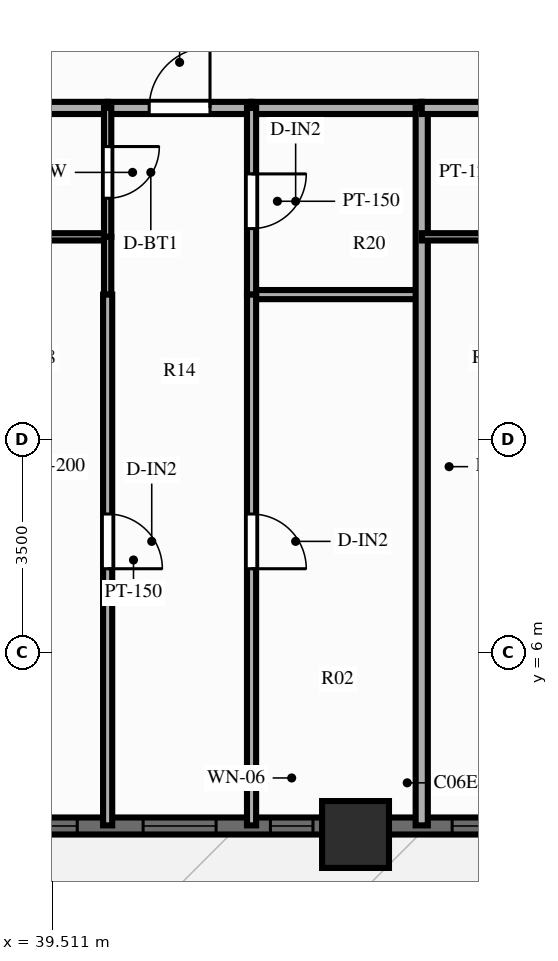
"""IFC4 building model, lengths in metres.
Left out: names, types, materials, properties, quantities, classifications, styles, units other than length and angle.
Written with IfcOpenShell. Run it as: python <this file> out.ifc"""

import sys

from ifc_helpers import new_model, si_unit, direction, frame, frame_2d, origin, origin_2d, place, context, subcontext, project, spatial, rectangle, extrude, source, transform, mapped, element, fill, save


model = new_model("IFC4")
c1 = context("Model", 3, precision=1e-05, world=origin(), true_north=direction((0.0, 1.0)))
c2 = subcontext(c1, "Body", "Model", "MODEL_VIEW")
j1 = project(units=[si_unit("LENGTHUNIT", "METRE"), si_unit("PLANEANGLEUNIT", "RADIAN")], contexts=[c1])
p1 = place(None, origin())
s1 = spatial("IfcSite", under=j1, at=p1, CompositionType="ELEMENT")
p2 = place(p1, origin())
s2 = spatial("IfcBuilding", under=s1, at=p2, CompositionType="ELEMENT")
p3 = place(p2, frame((0.0, 0.0, 22.4)))
s3 = spatial("IfcBuildingStorey", under=s2, at=p3, CompositionType="ELEMENT", Elevation=22.4)
m1 = source(origin(), c2, "Body", "SweptSolid", [
    extrude(rectangle(XDim=1.1, YDim=1.1, at=origin_2d()), origin(), (0.0, 0.0, 1.0), 3.0),
])
p4 = place(p3, frame((44.5, 3.0, 0.0), z_axis=(0.0, 0.0, 1.0), x_axis=(1.0, 0.0, 0.0)))
e1 = element("IfcColumn", 1, at=p4, inside=s3, PredefinedType="COLUMN", context=c2, shape_type="MappedRepresentation", body=[
    mapped(m1, transform((0.0, 0.0, 0.0), scale=1.0)),
])
p5 = place(p3, frame((15.5, 3.14, 0.0), z_axis=(0.0, 0.0, 1.0), x_axis=(1.0, 0.0, 0.0)))
e2 = element("IfcWall", 2, at=p5, inside=s3, PredefinedType="SOLIDWALL", context=c2, shape_type="SweptSolid", body=[
    extrude(rectangle(XDim=45.0, YDim=0.28, at=frame_2d((22.5, 0.0))), origin(), (0.0, 0.0, 1.0), 2.28),
])
p6 = place(p5, frame((0.785, 0.0, 0.25)))
e3 = element("IfcOpeningElement", 3, at=p6, cuts=e2, PredefinedType="OPENING", context=c2, shape_type="SweptSolid", body=[
    extrude(rectangle(XDim=1.2, YDim=1.5, at=frame_2d((0.6, 0.75))), frame((0.0, 0.152, 0.0), z_axis=(0.0, -1.0, 0.0), x_axis=(1.0, 0.0, 0.0)), (0.0, 0.0, 1.0), 0.304),
])
p7 = place(p5, frame((3.033, 0.0, 0.25)))
e4 = element("IfcOpeningElement", 4, at=p7, cuts=e2, PredefinedType="OPENING", context=c2, shape_type="SweptSolid", body=[
    extrude(rectangle(XDim=1.2, YDim=1.5, at=frame_2d((0.6, 0.75))), frame((0.0, 0.152, 0.0), z_axis=(0.0, -1.0, 0.0), x_axis=(1.0, 0.0, 0.0)), (0.0, 0.0, 1.0), 0.304),
])
p8 = place(p5, frame((5.727, 0.0, 0.25)))
e5 = element("IfcOpeningElement", 5, at=p8, cuts=e2, PredefinedType="OPENING", context=c2, shape_type="SweptSolid", body=[
    extrude(rectangle(XDim=1.2, YDim=1.5, at=frame_2d((0.6, 0.75))), frame((0.0, 0.152, 0.0), z_axis=(0.0, -1.0, 0.0), x_axis=(1.0, 0.0, 0.0)), (0.0, 0.0, 1.0), 0.304),
])
p9 = place(p5, frame((8.269, 0.0, 0.25)))
e6 = element("IfcOpeningElement", 6, at=p9, cuts=e2, PredefinedType="OPENING", context=c2, shape_type="SweptSolid", body=[
    extrude(rectangle(XDim=1.2, YDim=1.5, at=frame_2d((0.6, 0.75))), frame((0.0, 0.152, 0.0), z_axis=(0.0, -1.0, 0.0), x_axis=(1.0, 0.0, 0.0)), (0.0, 0.0, 1.0), 0.304),
])
p10 = place(p5, frame((10.621, 0.0, 0.25)))
e7 = element("IfcOpeningElement", 7, at=p10, cuts=e2, PredefinedType="OPENING", context=c2, shape_type="SweptSolid", body=[
    extrude(rectangle(XDim=1.2, YDim=1.5, at=frame_2d((0.6, 0.75))), frame((0.0, 0.152, 0.0), z_axis=(0.0, -1.0, 0.0), x_axis=(1.0, 0.0, 0.0)), (0.0, 0.0, 1.0), 0.304),
])
p11 = place(p5, frame((13.316, 0.0, 0.25)))
e8 = element("IfcOpeningElement", 8, at=p11, cuts=e2, PredefinedType="OPENING", context=c2, shape_type="SweptSolid", body=[
    extrude(rectangle(XDim=1.2, YDim=1.5, at=frame_2d((0.6, 0.75))), frame((0.0, 0.152, 0.0), z_axis=(0.0, -1.0, 0.0), x_axis=(1.0, 0.0, 0.0)), (0.0, 0.0, 1.0), 0.304),
])
p12 = place(p5, frame((16.624, 0.0, 0.25)))
e9 = element("IfcOpeningElement", 9, at=p12, cuts=e2, PredefinedType="OPENING", context=c2, shape_type="SweptSolid", body=[
    extrude(rectangle(XDim=0.7, YDim=1.5, at=frame_2d((0.35, 0.75))), frame((0.0, 0.152, 0.0), z_axis=(0.0, -1.0, 0.0), x_axis=(1.0, 0.0, 0.0)), (0.0, 0.0, 1.0), 0.304),
])
p13 = place(p5, frame((18.141, 0.0, 0.25)))
e10 = element("IfcOpeningElement", 10, at=p13, cuts=e2, PredefinedType="OPENING", context=c2, shape_type="SweptSolid", body=[
    extrude(rectangle(XDim=1.2, YDim=1.5, at=frame_2d((0.6, 0.75))), frame((0.0, 0.152, 0.0), z_axis=(0.0, -1.0, 0.0), x_axis=(1.0, 0.0, 0.0)), (0.0, 0.0, 1.0), 0.304),
])
p14 = place(p5, frame((21.874, 0.0, 0.0), z_axis=(0.0, 0.0, 1.0), x_axis=(-1.0, 0.0, 0.0)))
e11 = element("IfcOpeningElement", 11, at=p14, cuts=e2, PredefinedType="OPENING", context=c2, shape_type="SweptSolid", body=[
    extrude(rectangle(XDim=1.1, YDim=2.15, at=frame_2d((0.55, 1.075))), frame((0.0, 0.152, 0.0), z_axis=(0.0, -1.0, 0.0), x_axis=(1.0, 0.0, 0.0)), (0.0, 0.0, 1.0), 0.304),
])
p15 = place(p5, frame((23.223, 0.0, 0.25)))
e12 = element("IfcOpeningElement", 12, at=p15, cuts=e2, PredefinedType="OPENING", context=c2, shape_type="SweptSolid", body=[
    extrude(rectangle(XDim=1.2, YDim=1.5, at=frame_2d((0.6, 0.75))), frame((0.0, 0.152, 0.0), z_axis=(0.0, -1.0, 0.0), x_axis=(1.0, 0.0, 0.0)), (0.0, 0.0, 1.0), 0.304),
])
p16 = place(p5, frame((25.507, 0.0, 0.25)))
e13 = element("IfcOpeningElement", 13, at=p16, cuts=e2, PredefinedType="OPENING", context=c2, shape_type="SweptSolid", body=[
    extrude(rectangle(XDim=1.2, YDim=1.5, at=frame_2d((0.6, 0.75))), frame((0.0, 0.152, 0.0), z_axis=(0.0, -1.0, 0.0), x_axis=(1.0, 0.0, 0.0)), (0.0, 0.0, 1.0), 0.304),
])
p17 = place(p5, frame((27.6, 0.0, 0.25)))
e14 = element("IfcOpeningElement", 14, at=p17, cuts=e2, PredefinedType="OPENING", context=c2, shape_type="SweptSolid", body=[
    extrude(rectangle(XDim=0.7, YDim=1.5, at=frame_2d((0.35, 0.75))), frame((0.0, 0.152, 0.0), z_axis=(0.0, -1.0, 0.0), x_axis=(1.0, 0.0, 0.0)), (0.0, 0.0, 1.0), 0.304),
])
p18 = place(p5, frame((30.589, 0.0, 0.25)))
e15 = element("IfcOpeningElement", 15, at=p18, cuts=e2, PredefinedType="OPENING", context=c2, shape_type="SweptSolid", body=[
    extrude(rectangle(XDim=1.2, YDim=1.5, at=frame_2d((0.6, 0.75))), frame((0.0, 0.152, 0.0), z_axis=(0.0, -1.0, 0.0), x_axis=(1.0, 0.0, 0.0)), (0.0, 0.0, 1.0), 0.304),
])
p19 = place(p5, frame((32.872, 0.0, 0.25)))
e16 = element("IfcOpeningElement", 16, at=p19, cuts=e2, PredefinedType="OPENING", context=c2, shape_type="SweptSolid", body=[
    extrude(rectangle(XDim=1.2, YDim=1.5, at=frame_2d((0.6, 0.75))), frame((0.0, 0.152, 0.0), z_axis=(0.0, -1.0, 0.0), x_axis=(1.0, 0.0, 0.0)), (0.0, 0.0, 1.0), 0.304),
])
p20 = place(p5, frame((35.455, 0.0, 0.25)))
e17 = element("IfcOpeningElement", 17, at=p20, cuts=e2, PredefinedType="OPENING", context=c2, shape_type="SweptSolid", body=[
    extrude(rectangle(XDim=1.2, YDim=1.5, at=frame_2d((0.6, 0.75))), frame((0.0, 0.152, 0.0), z_axis=(0.0, -1.0, 0.0), x_axis=(1.0, 0.0, 0.0)), (0.0, 0.0, 1.0), 0.304),
])
p21 = place(p5, frame((37.954, 0.0, 0.25)))
e18 = element("IfcOpeningElement", 18, at=p21, cuts=e2, PredefinedType="OPENING", context=c2, shape_type="SweptSolid", body=[
    extrude(rectangle(XDim=1.2, YDim=1.5, at=frame_2d((0.6, 0.75))), frame((0.0, 0.152, 0.0), z_axis=(0.0, -1.0, 0.0), x_axis=(1.0, 0.0, 0.0)), (0.0, 0.0, 1.0), 0.304),
])
p22 = place(p5, frame((40.238, 0.0, 0.25)))
e19 = element("IfcOpeningElement", 19, at=p22, cuts=e2, PredefinedType="OPENING", context=c2, shape_type="SweptSolid", body=[
    extrude(rectangle(XDim=1.2, YDim=1.5, at=frame_2d((0.6, 0.75))), frame((0.0, 0.152, 0.0), z_axis=(0.0, -1.0, 0.0), x_axis=(1.0, 0.0, 0.0)), (0.0, 0.0, 1.0), 0.304),
])
p23 = place(p5, frame((42.716, 0.0, 0.25)))
e20 = element("IfcOpeningElement", 20, at=p23, cuts=e2, PredefinedType="OPENING", context=c2, shape_type="SweptSolid", body=[
    extrude(rectangle(XDim=1.2, YDim=1.5, at=frame_2d((0.6, 0.75))), frame((0.0, 0.152, 0.0), z_axis=(0.0, -1.0, 0.0), x_axis=(1.0, 0.0, 0.0)), (0.0, 0.0, 1.0), 0.304),
])
p24 = place(p3, frame((38.223, 14.95, 0.0), z_axis=(0.0, 0.0, 1.0), x_axis=(1.0, 0.0, 0.0)))
e21 = element("IfcWall", 21, at=p24, inside=s3, PredefinedType="PARTITIONING", context=c2, shape_type="SweptSolid", body=[
    extrude(rectangle(XDim=2.2, YDim=0.2, at=frame_2d((1.1, 0.0))), origin(), (0.0, 0.0, 1.0), 2.79),
])
p25 = place(p3, frame((40.423, 14.95, 0.0), z_axis=(0.0, 0.0, 1.0), x_axis=(1.0, 0.0, 0.0)))
e22 = element("IfcWall", 22, at=p25, inside=s3, PredefinedType="PARTITIONING", context=c2, shape_type="SweptSolid", body=[
    extrude(rectangle(XDim=2.367, YDim=0.2, at=frame_2d((1.183, 0.0))), origin(), (0.0, 0.0, 1.0), 2.79),
])
p26 = place(p25, frame((0.683, 0.0, 0.0)))
e23 = element("IfcOpeningElement", 23, at=p26, cuts=e22, PredefinedType="OPENING", context=c2, shape_type="SweptSolid", body=[
    extrude(rectangle(XDim=1.0, YDim=2.15, at=frame_2d((0.5, 1.075))), frame((0.0, 0.112, 0.0), z_axis=(0.0, -1.0, 0.0), x_axis=(1.0, 0.0, 0.0)), (0.0, 0.0, 1.0), 0.224),
])
p27 = place(p3, frame((42.79, 14.95, 0.0), z_axis=(0.0, 0.0, 1.0), x_axis=(1.0, 0.0, 0.0)))
e24 = element("IfcWall", 24, at=p27, inside=s3, PredefinedType="PARTITIONING", context=c2, shape_type="SweptSolid", body=[
    extrude(rectangle(XDim=2.799, YDim=0.2, at=frame_2d((1.399, 0.0))), origin(), (0.0, 0.0, 1.0), 2.79),
])
p28 = place(p3, frame((38.223, 12.83, 0.0), z_axis=(0.0, 0.0, 1.0), x_axis=(1.0, 0.0, 0.0)))
e25 = element("IfcWall", 25, at=p28, inside=s3, PredefinedType="PARTITIONING", context=c2, shape_type="SweptSolid", body=[
    extrude(rectangle(XDim=2.2, YDim=0.12, at=frame_2d((1.1, 0.0))), origin(), (0.0, 0.0, 1.0), 2.79),
])
p29 = place(p3, frame((42.79, 11.88, 0.0), z_axis=(0.0, 0.0, 1.0), x_axis=(1.0, 0.0, 0.0)))
e26 = element("IfcWall", 26, at=p29, inside=s3, PredefinedType="PARTITIONING", context=c2, shape_type="SweptSolid", body=[
    extrude(rectangle(XDim=2.799, YDim=0.15, at=frame_2d((1.399, 0.0))), origin(), (0.0, 0.0, 1.0), 2.79),
])
p30 = place(p3, frame((40.423, 14.95, 0.0), z_axis=(0.0, 0.0, 1.0), x_axis=(0.0, -1.0, 0.0)))
e27 = element("IfcWall", 27, at=p30, inside=s3, PredefinedType="PARTITIONING", context=c2, shape_type="SweptSolid", body=[
    extrude(rectangle(XDim=2.12, YDim=0.12, at=frame_2d((1.06, 0.0))), origin(), (0.0, 0.0, 1.0), 2.79),
])
p31 = place(p30, frame((0.635, 0.0, 0.0)))
e28 = element("IfcOpeningElement", 28, at=p31, cuts=e27, PredefinedType="OPENING", context=c2, shape_type="SweptSolid", body=[
    extrude(rectangle(XDim=0.85, YDim=2.05, at=frame_2d((0.425, 1.025))), frame((0.0, 0.072, 0.0), z_axis=(0.0, -1.0, 0.0), x_axis=(1.0, 0.0, 0.0)), (0.0, 0.0, 1.0), 0.144),
])
p32 = place(p3, frame((40.423, 12.83, 0.0), z_axis=(0.0, 0.0, 1.0), x_axis=(0.0, -1.0, 0.0)))
e29 = element("IfcWall", 29, at=p32, inside=s3, PredefinedType="PARTITIONING", context=c2, shape_type="SweptSolid", body=[
    extrude(rectangle(XDim=0.95, YDim=0.12, at=frame_2d((0.475, 0.0))), origin(), (0.0, 0.0, 1.0), 2.79),
])
p33 = place(p3, frame((40.423, 11.88, 0.0), z_axis=(0.0, 0.0, 1.0), x_axis=(0.0, -1.0, 0.0)))
e30 = element("IfcWall", 30, at=p33, inside=s3, PredefinedType="PARTITIONING", context=c2, shape_type="SweptSolid", body=[
    extrude(rectangle(XDim=8.73, YDim=0.15, at=frame_2d((4.365, 0.0))), origin(), (0.0, 0.0, 1.0), 2.79),
])
p34 = place(p33, frame((3.609, 0.0, 0.0)))
e31 = element("IfcOpeningElement", 31, at=p34, cuts=e30, PredefinedType="OPENING", context=c2, shape_type="SweptSolid", body=[
    extrude(rectangle(XDim=0.9, YDim=2.1, at=frame_2d((0.45, 1.05))), frame((0.0, 0.087, 0.0), z_axis=(0.0, -1.0, 0.0), x_axis=(1.0, 0.0, 0.0)), (0.0, 0.0, 1.0), 0.174),
])
p35 = place(p3, frame((42.79, 14.95, 0.0), z_axis=(0.0, 0.0, 1.0), x_axis=(0.0, -1.0, 0.0)))
e32 = element("IfcWall", 32, at=p35, inside=s3, PredefinedType="PARTITIONING", context=c2, shape_type="SweptSolid", body=[
    extrude(rectangle(XDim=3.07, YDim=0.15, at=frame_2d((1.535, 0.0))), origin(), (0.0, 0.0, 1.0), 2.79),
])
p36 = place(p35, frame((1.085, 0.0, 0.0)))
e33 = element("IfcOpeningElement", 33, at=p36, cuts=e32, PredefinedType="OPENING", context=c2, shape_type="SweptSolid", body=[
    extrude(rectangle(XDim=0.9, YDim=2.1, at=frame_2d((0.45, 1.05))), frame((0.0, 0.087, 0.0), z_axis=(0.0, -1.0, 0.0), x_axis=(1.0, 0.0, 0.0)), (0.0, 0.0, 1.0), 0.174),
])
p37 = place(p3, frame((42.79, 11.88, 0.0), z_axis=(0.0, 0.0, 1.0), x_axis=(0.0, -1.0, 0.0)))
e34 = element("IfcWall", 34, at=p37, inside=s3, PredefinedType="PARTITIONING", context=c2, shape_type="SweptSolid", body=[
    extrude(rectangle(XDim=8.73, YDim=0.15, at=frame_2d((4.365, 0.0))), origin(), (0.0, 0.0, 1.0), 2.79),
])
p38 = place(p37, frame((3.609, 0.0, 0.0)))
e35 = element("IfcOpeningElement", 35, at=p38, cuts=e34, PredefinedType="OPENING", context=c2, shape_type="SweptSolid", body=[
    extrude(rectangle(XDim=0.9, YDim=2.1, at=frame_2d((0.45, 1.05))), frame((0.0, 0.087, 0.0), z_axis=(0.0, -1.0, 0.0), x_axis=(1.0, 0.0, 0.0)), (0.0, 0.0, 1.0), 0.174),
])
p39 = place(p3, frame((45.589, 14.95, 0.0), z_axis=(0.0, 0.0, 1.0), x_axis=(0.0, -1.0, 0.0)))
e36 = element("IfcWall", 36, at=p39, inside=s3, PredefinedType="PARTITIONING", context=c2, shape_type="SweptSolid", body=[
    extrude(rectangle(XDim=11.8, YDim=0.2, at=frame_2d((5.9, 0.0))), origin(), (0.0, 0.0, 1.0), 2.24),
])
p40 = place(p3, frame((45.589, 14.95, 0.0), z_axis=(0.0, 0.0, 1.0), x_axis=(1.0, 0.0, 0.0)))
e37 = element("IfcWall", 37, at=p40, inside=s3, PredefinedType="PARTITIONING", context=c2, shape_type="SweptSolid", body=[
    extrude(rectangle(XDim=2.2, YDim=0.2, at=frame_2d((1.1, 0.0))), origin(), (0.0, 0.0, 1.0), 2.79),
])
p41 = place(p3, frame((45.589, 12.83, 0.0), z_axis=(0.0, 0.0, 1.0), x_axis=(1.0, 0.0, 0.0)))
e38 = element("IfcWall", 38, at=p41, inside=s3, PredefinedType="PARTITIONING", context=c2, shape_type="SweptSolid", body=[
    extrude(rectangle(XDim=2.2, YDim=0.12, at=frame_2d((1.1, 0.0))), origin(), (0.0, 0.0, 1.0), 2.79),
])
m2 = source(origin(), c2, "Body", "SweptSolid", [
    extrude(rectangle(XDim=1.2, YDim=1.5, at=frame_2d((0.6, 0.75))), frame((0.0, 0.03, 0.0), z_axis=(0.0, -1.0, 0.0), x_axis=(1.0, 0.0, 0.0)), (0.0, 0.0, 1.0), 0.06),
])
p42 = place(p15, origin())
e39 = element("IfcWindow", 39, at=p42, inside=s3, PartitioningType="SINGLE_PANEL", PredefinedType="WINDOW", context=c2, shape_type="MappedRepresentation", body=[
    mapped(m2, transform((0.0, 0.0, 0.0), scale=1.0)),
])
fill(e12, e39)
p43 = place(p16, origin())
e40 = element("IfcWindow", 40, at=p43, inside=s3, PartitioningType="SINGLE_PANEL", PredefinedType="WINDOW", context=c2, shape_type="MappedRepresentation", body=[
    mapped(m2, transform((0.0, 0.0, 0.0), scale=1.0)),
])
fill(e13, e40)
m3 = source(origin(), c2, "Body", "SweptSolid", [
    extrude(rectangle(XDim=0.7, YDim=1.5, at=frame_2d((0.35, 0.75))), frame((0.0, 0.03, 0.0), z_axis=(0.0, -1.0, 0.0), x_axis=(1.0, 0.0, 0.0)), (0.0, 0.0, 1.0), 0.06),
])
p44 = place(p17, origin())
e41 = element("IfcWindow", 41, at=p44, inside=s3, PartitioningType="SINGLE_PANEL", PredefinedType="WINDOW", context=c2, shape_type="MappedRepresentation", body=[
    mapped(m3, transform((0.0, 0.0, 0.0), scale=1.0)),
])
fill(e14, e41)
p45 = place(p18, origin())
e42 = element("IfcWindow", 42, at=p45, inside=s3, PartitioningType="SINGLE_PANEL", PredefinedType="WINDOW", context=c2, shape_type="MappedRepresentation", body=[
    mapped(m2, transform((0.0, 0.0, 0.0), scale=1.0)),
])
fill(e15, e42)
m4 = source(origin(), c2, "Body", "SweptSolid", [
    extrude(rectangle(XDim=1.0, YDim=2.15, at=frame_2d((0.5, 1.075))), frame((0.0, 0.025, 0.0), z_axis=(0.0, -1.0, 0.0), x_axis=(1.0, 0.0, 0.0)), (0.0, 0.0, 1.0), 0.05),
])
p46 = place(p26, origin())
e43 = element("IfcDoor", 43, at=p46, inside=s3, OperationType="SINGLE_SWING_RIGHT", PredefinedType="DOOR", context=c2, shape_type="MappedRepresentation", body=[
    mapped(m4, transform((0.0, 0.0, 0.0), scale=1.0)),
])
fill(e23, e43)
m5 = source(origin(), c2, "Body", "SweptSolid", [
    extrude(rectangle(XDim=0.85, YDim=2.05, at=frame_2d((0.425, 1.025))), frame((0.0, 0.025, 0.0), z_axis=(0.0, -1.0, 0.0), x_axis=(1.0, 0.0, 0.0)), (0.0, 0.0, 1.0), 0.05),
])
p47 = place(p31, origin())
e44 = element("IfcDoor", 44, at=p47, inside=s3, OperationType="SINGLE_SWING_LEFT", PredefinedType="DOOR", context=c2, shape_type="MappedRepresentation", body=[
    mapped(m5, transform((0.0, 0.0, 0.0), scale=1.0)),
])
fill(e28, e44)
m6 = source(origin(), c2, "Body", "SweptSolid", [
    extrude(rectangle(XDim=0.9, YDim=2.1, at=frame_2d((0.45, 1.05))), frame((0.0, 0.025, 0.0), z_axis=(0.0, -1.0, 0.0), x_axis=(1.0, 0.0, 0.0)), (0.0, 0.0, 1.0), 0.05),
])
p48 = place(p34, origin())
e45 = element("IfcDoor", 45, at=p48, inside=s3, OperationType="SINGLE_SWING_RIGHT", PredefinedType="DOOR", context=c2, shape_type="MappedRepresentation", body=[
    mapped(m6, transform((0.0, 0.0, 0.0), scale=1.0)),
])
fill(e31, e45)
p49 = place(p36, origin())
e46 = element("IfcDoor", 46, at=p49, inside=s3, OperationType="SINGLE_SWING_LEFT", PredefinedType="DOOR", context=c2, shape_type="MappedRepresentation", body=[
    mapped(m6, transform((0.0, 0.0, 0.0), scale=1.0)),
])
fill(e33, e46)
p50 = place(p38, origin())
e47 = element("IfcDoor", 47, at=p50, inside=s3, OperationType="SINGLE_SWING_RIGHT", PredefinedType="DOOR", context=c2, shape_type="MappedRepresentation", body=[
    mapped(m6, transform((0.0, 0.0, 0.0), scale=1.0)),
])
fill(e35, e47)
save(model, sys.argv[1])
